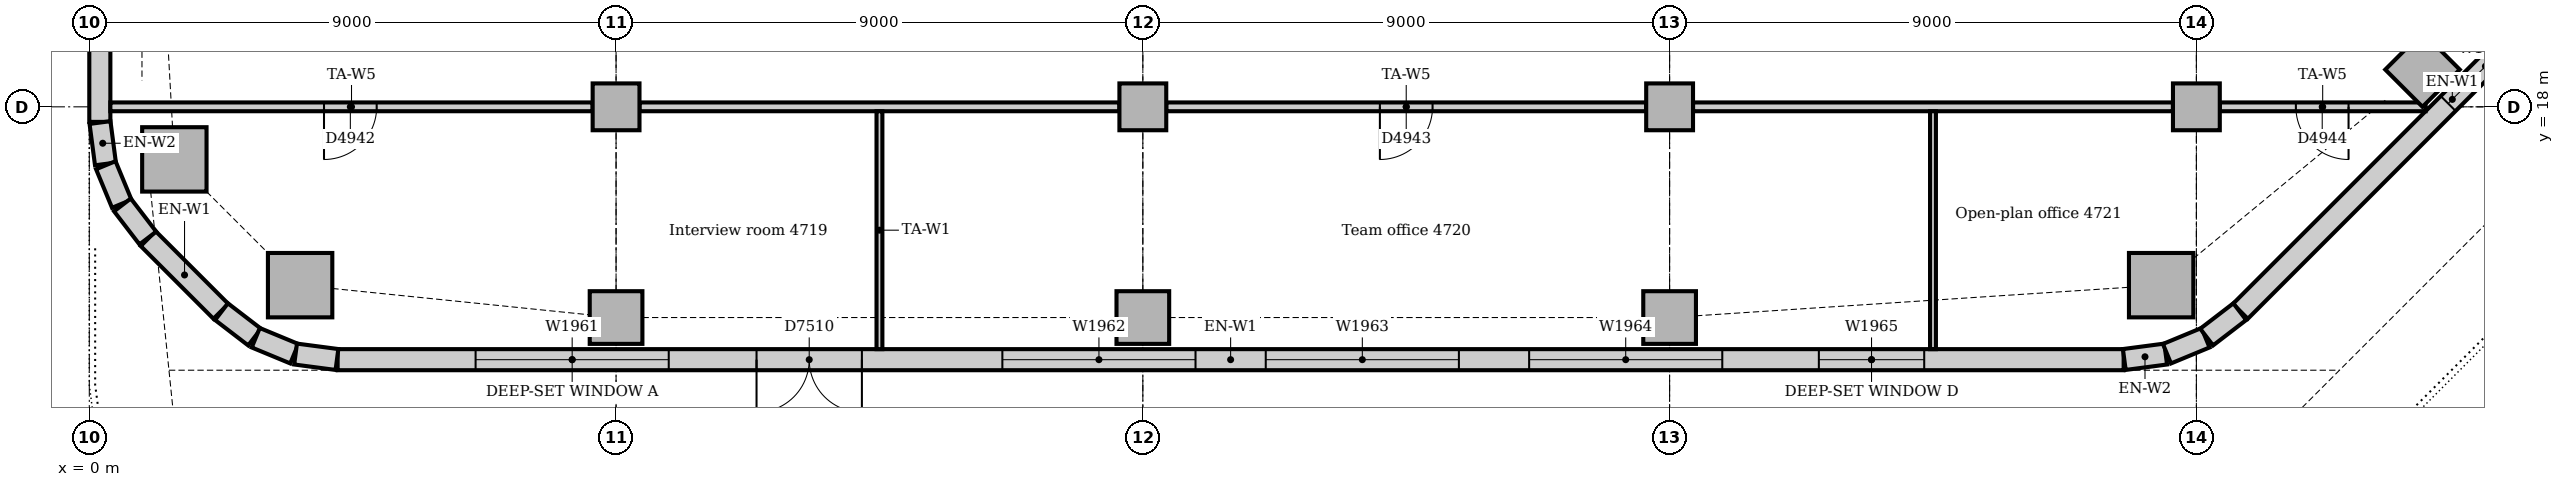
"""IFC4 building model, lengths in metres.
Left out: names, types, materials, properties, quantities, classifications, styles, units other than length and angle.
Written with IfcOpenShell. Run it as: python <this file> out.ifc"""

import sys

from ifc_helpers import new_model, si_unit, direction, frame, frame_2d, origin, origin_2d, place, context, subcontext, project, spatial, rectangle, extrude, element, fill, save


model = new_model("IFC4")
c1 = context("Model", 3, precision=1e-05, world=origin(), true_north=direction((0.0, 1.0)))
c2 = subcontext(c1, "Body", "Model", "MODEL_VIEW")
j1 = project(units=[si_unit("LENGTHUNIT", "METRE"), si_unit("PLANEANGLEUNIT", "RADIAN")], contexts=[c1])
p1 = place(None, origin())
s1 = spatial("IfcSite", under=j1, at=p1, CompositionType="ELEMENT")
p2 = place(p1, origin())
s2 = spatial("IfcBuilding", under=s1, at=p2, CompositionType="ELEMENT")
p3 = place(p2, frame((0.0, 0.0, 198.0)))
s3 = spatial("IfcBuildingStorey", under=s2, at=p3, CompositionType="ELEMENT", Elevation=198.0)
for number, where, z_axis, x_axis in (
    (1, (3.602, 14.953, -0.15), (0.0, 0.0, 1.0), (1.0, 0.0, 0.0)),
    (2, (35.398, 14.953, -0.15), (0.0, 0.0, 1.0), (1.0, 0.0, 0.0)),
    (3, (1.453, 17.102, -0.15), (0.0, 0.0, 1.0), (1.0, 0.0, 0.0)),
):
    element("IfcColumn", number, at=place(p3, frame(where, z_axis=z_axis, x_axis=x_axis)), inside=s3, PredefinedType="COLUMN", context=c2, shape_type="SweptSolid", body=[
        extrude(rectangle(XDim=1.1, YDim=1.1, at=origin_2d()), origin(), (0.0, 0.0, 1.0), 4.0),
    ])
for number, where, z_axis, x_axis in (
    (4, (9.0, 14.4, -0.15), (0.0, 0.0, 1.0), (1.0, 0.0, 0.0)),
    (5, (18.0, 14.4, -0.15), (0.0, 0.0, 1.0), (1.0, 0.0, 0.0)),
    (6, (27.0, 14.4, -0.15), (0.0, 0.0, 1.0), (1.0, 0.0, 0.0)),
    (7, (39.864, 18.636, -0.15), (0.0, 0.0, 1.0), (0.707, 0.707, 0.0)),
):
    element("IfcColumn", number, at=place(p3, frame(where, z_axis=z_axis, x_axis=x_axis)), inside=s3, PredefinedType="COLUMN", context=c2, shape_type="SweptSolid", body=[
        extrude(rectangle(XDim=0.9, YDim=0.9, at=origin_2d()), origin(), (0.0, 0.0, 1.0), 4.0),
    ])
for number, where, z_axis, x_axis in (
    (8, (9.0, 18.0, 0.0), (0.0, 0.0, 1.0), (1.0, 0.0, 0.0)),
    (9, (18.0, 18.0, 0.0), (0.0, 0.0, 1.0), (1.0, 0.0, 0.0)),
    (10, (27.0, 18.0, 0.0), (0.0, 0.0, 1.0), (1.0, 0.0, 0.0)),
    (11, (36.0, 18.0, 0.0), (0.0, 0.0, 1.0), (1.0, 0.0, 0.0)),
):
    element("IfcColumn", number, at=place(p3, frame(where, z_axis=z_axis, x_axis=x_axis)), inside=s3, PredefinedType="COLUMN", context=c2, shape_type="SweptSolid", body=[
        extrude(rectangle(XDim=0.8, YDim=0.8, at=origin_2d()), origin(), (0.0, 0.0, 1.0), 3.85),
    ])
p4 = place(p3, frame((4.243, 13.68, 0.0), z_axis=(0.0, 0.0, 1.0), x_axis=(1.0, 0.0, 0.0)))
e12 = element("IfcWall", 12, at=p4, inside=s3, PredefinedType="STANDARD", context=c2, shape_type="SweptSolid", body=[
    extrude(rectangle(XDim=30.515, YDim=0.36, at=frame_2d((15.257, 0.0))), origin(), (0.0, 0.0, 1.0), 3.85),
])
p5 = place(p4, frame((2.357, 0.0, 0.9)))
e13 = element("IfcOpeningElement", 13, at=p5, cuts=e12, PredefinedType="OPENING", context=c2, shape_type="SweptSolid", body=[
    extrude(rectangle(XDim=3.3, YDim=1.6, at=frame_2d((1.65, 0.8))), frame((0.0, 0.19, 0.0), z_axis=(0.0, -1.0, 0.0), x_axis=(1.0, 0.0, 0.0)), (0.0, 0.0, 1.0), 0.38),
])
p6 = place(p4, frame((7.157, 0.0, 0.0)))
e14 = element("IfcOpeningElement", 14, at=p6, cuts=e12, PredefinedType="OPENING", context=c2, shape_type="SweptSolid", body=[
    extrude(rectangle(XDim=1.8, YDim=2.4, at=frame_2d((0.9, 1.2))), frame((0.0, 0.19, 0.0), z_axis=(0.0, -1.0, 0.0), x_axis=(1.0, 0.0, 0.0)), (0.0, 0.0, 1.0), 0.38),
])
p7 = place(p4, frame((11.357, 0.0, 0.9)))
e15 = element("IfcOpeningElement", 15, at=p7, cuts=e12, PredefinedType="OPENING", context=c2, shape_type="SweptSolid", body=[
    extrude(rectangle(XDim=3.3, YDim=1.6, at=frame_2d((1.65, 0.8))), frame((0.0, 0.19, 0.0), z_axis=(0.0, -1.0, 0.0), x_axis=(1.0, 0.0, 0.0)), (0.0, 0.0, 1.0), 0.38),
])
p8 = place(p4, frame((15.857, 0.0, 0.9)))
e16 = element("IfcOpeningElement", 16, at=p8, cuts=e12, PredefinedType="OPENING", context=c2, shape_type="SweptSolid", body=[
    extrude(rectangle(XDim=3.3, YDim=1.6, at=frame_2d((1.65, 0.8))), frame((0.0, 0.19, 0.0), z_axis=(0.0, -1.0, 0.0), x_axis=(1.0, 0.0, 0.0)), (0.0, 0.0, 1.0), 0.38),
])
p9 = place(p4, frame((20.357, 0.0, 0.9)))
e17 = element("IfcOpeningElement", 17, at=p9, cuts=e12, PredefinedType="OPENING", context=c2, shape_type="SweptSolid", body=[
    extrude(rectangle(XDim=3.3, YDim=1.6, at=frame_2d((1.65, 0.8))), frame((0.0, 0.19, 0.0), z_axis=(0.0, -1.0, 0.0), x_axis=(1.0, 0.0, 0.0)), (0.0, 0.0, 1.0), 0.38),
])
p10 = place(p4, frame((25.307, 0.0, 0.9)))
e18 = element("IfcOpeningElement", 18, at=p10, cuts=e12, PredefinedType="OPENING", context=c2, shape_type="SweptSolid", body=[
    extrude(rectangle(XDim=1.8, YDim=1.6, at=frame_2d((0.9, 0.8))), frame((0.0, 0.19, 0.0), z_axis=(0.0, -1.0, 0.0), x_axis=(1.0, 0.0, 0.0)), (0.0, 0.0, 1.0), 0.38),
])
p11 = place(p3, frame((36.751, 14.506, 0.0), z_axis=(0.0, 0.0, 1.0), x_axis=(0.707106781187, 0.707106781187, 0.0)))
e19 = element("IfcWall", 19, at=p11, inside=s3, PredefinedType="STANDARD", context=c2, shape_type="SweptSolid", body=[
    extrude(rectangle(XDim=10.243, YDim=0.36, at=frame_2d((5.121, 0.0))), origin(), (0.0, 0.0, 1.0), 3.85),
])
p12 = place(p11, frame((5.021, 0.0, 0.9)))
e20 = element("IfcOpeningElement", 20, at=p12, cuts=e19, PredefinedType="OPENING", context=c2, shape_type="SweptSolid", body=[
    extrude(rectangle(XDim=1.8, YDim=1.6, at=frame_2d((0.9, 0.8))), frame((0.0, 0.19, 0.0), z_axis=(0.0, -1.0, 0.0), x_axis=(1.0, 0.0, 0.0)), (0.0, 0.0, 1.0), 0.38),
])
p13 = place(p3, frame((0.18, 21.0, 0.0), z_axis=(0.0, 0.0, 1.0), x_axis=(0.0, -1.0, 0.0)))
e21 = element("IfcWall", 21, at=p13, inside=s3, PredefinedType="STANDARD", context=c2, shape_type="SweptSolid", body=[
    extrude(rectangle(XDim=3.257, YDim=0.36, at=frame_2d((1.629, 0.0))), origin(), (0.0, 0.0, 1.0), 3.85),
])
p14 = place(p3, frame((1.006, 15.749, 0.0), z_axis=(0.0, 0.0, 1.0), x_axis=(0.707106781187, -0.707106781187, 0.0)))
e22 = element("IfcWall", 22, at=p14, inside=s3, PredefinedType="STANDARD", context=c2, shape_type="SweptSolid", body=[
    extrude(rectangle(XDim=1.757, YDim=0.36, at=frame_2d((0.879, 0.0))), origin(), (0.0, 0.0, 1.0), 3.85),
])
for number, where, z_axis, x_axis in (
    (23, (34.769, 13.683, 0.0), (0.0, 0.0, 1.0), (0.991, 0.131, 0.0)),
    (24, (35.497, 13.782, 0.0), (0.0, 0.0, 1.0), (0.924, 0.383, 0.0)),
):
    element("IfcWall", number, at=place(p3, frame(where, z_axis=z_axis, x_axis=x_axis)), inside=s3, PredefinedType="STANDARD", context=c2, shape_type="SweptSolid", body=[
        extrude(rectangle(XDim=0.713, YDim=0.36, at=frame_2d((0.356, 0.0))), origin(), (0.0, 0.0, 1.0), 3.85),
    ])
p15 = place(p3, frame((36.175, 14.066, 0.0), z_axis=(0.0, 0.0, 1.0), x_axis=(0.793321924995, 0.608802368033, 0.0)))
e25 = element("IfcWall", 25, at=p15, inside=s3, PredefinedType="STANDARD", context=c2, shape_type="SweptSolid", body=[
    extrude(rectangle(XDim=0.713, YDim=0.36, at=frame_2d((0.357, 0.0))), origin(), (0.0, 0.0, 1.0), 3.85),
])
for number, where, z_axis, x_axis in (
    (26, (0.183, 17.731, 0.0), (0.0, 0.0, 1.0), (0.131, -0.991, 0.0)),
    (27, (0.282, 17.003, 0.0), (0.0, 0.0, 1.0), (0.383, -0.924, 0.0)),
):
    element("IfcWall", number, at=place(p3, frame(where, z_axis=z_axis, x_axis=x_axis)), inside=s3, PredefinedType="STANDARD", context=c2, shape_type="SweptSolid", body=[
        extrude(rectangle(XDim=0.713, YDim=0.36, at=frame_2d((0.356, 0.0))), origin(), (0.0, 0.0, 1.0), 3.85),
    ])
for number, where, z_axis, x_axis in (
    (28, (0.566, 16.325, 0.0), (0.0, 0.0, 1.0), (0.609, -0.793, 0.0)),
    (29, (2.259, 14.5, 0.0), (0.0, 0.0, 1.0), (0.793, -0.609, 0.0)),
):
    element("IfcWall", number, at=place(p3, frame(where, z_axis=z_axis, x_axis=x_axis)), inside=s3, PredefinedType="STANDARD", context=c2, shape_type="SweptSolid", body=[
        extrude(rectangle(XDim=0.713, YDim=0.36, at=frame_2d((0.357, 0.0))), origin(), (0.0, 0.0, 1.0), 3.85),
    ])
for number, where, z_axis, x_axis in (
    (30, (2.844, 14.055, 0.0), (0.0, 0.0, 1.0), (0.924, -0.383, 0.0)),
    (31, (3.524, 13.776, 0.0), (0.0, 0.0, 1.0), (0.991, -0.131, 0.0)),
):
    element("IfcWall", number, at=place(p3, frame(where, z_axis=z_axis, x_axis=x_axis)), inside=s3, PredefinedType="STANDARD", context=c2, shape_type="SweptSolid", body=[
        extrude(rectangle(XDim=0.713, YDim=0.36, at=frame_2d((0.356, 0.0))), origin(), (0.0, 0.0, 1.0), 3.85),
    ])
p16 = place(p3, frame((36.4, 18.0, 0.0), z_axis=(0.0, 0.0, 1.0), x_axis=(1.0, 0.0, 0.0)))
e32 = element("IfcWall", 32, at=p16, inside=s3, PredefinedType="PARTITIONING", context=c2, shape_type="SweptSolid", body=[
    extrude(rectangle(XDim=3.516, YDim=0.15, at=frame_2d((1.758, 0.0))), origin(), (0.0, 0.0, 1.0), 3.602),
])
p17 = place(p16, frame((1.3, 0.0, 0.0)))
e33 = element("IfcOpeningElement", 33, at=p17, cuts=e32, PredefinedType="OPENING", context=c2, shape_type="SweptSolid", body=[
    extrude(rectangle(XDim=0.9, YDim=2.1, at=frame_2d((0.45, 1.05))), frame((0.0, 0.085, 0.0), z_axis=(0.0, -1.0, 0.0), x_axis=(1.0, 0.0, 0.0)), (0.0, 0.0, 1.0), 0.17),
])
p18 = place(p3, frame((27.4, 18.0, 0.0), z_axis=(0.0, 0.0, 1.0), x_axis=(1.0, 0.0, 0.0)))
e34 = element("IfcWall", 34, at=p18, inside=s3, PredefinedType="PARTITIONING", context=c2, shape_type="SweptSolid", body=[
    extrude(rectangle(XDim=8.2, YDim=0.15, at=frame_2d((4.1, 0.0))), origin(), (0.0, 0.0, 1.0), 3.254),
])
p19 = place(p3, frame((18.4, 18.0, 0.0), z_axis=(0.0, 0.0, 1.0), x_axis=(1.0, 0.0, 0.0)))
e35 = element("IfcWall", 35, at=p19, inside=s3, PredefinedType="PARTITIONING", context=c2, shape_type="SweptSolid", body=[
    extrude(rectangle(XDim=8.2, YDim=0.15, at=frame_2d((4.1, 0.0))), origin(), (0.0, 0.0, 1.0), 3.254),
])
p20 = place(p19, frame((3.65, 0.0, 0.0)))
e36 = element("IfcOpeningElement", 36, at=p20, cuts=e35, PredefinedType="OPENING", context=c2, shape_type="SweptSolid", body=[
    extrude(rectangle(XDim=0.9, YDim=2.1, at=frame_2d((0.45, 1.05))), frame((0.0, 0.085, 0.0), z_axis=(0.0, -1.0, 0.0), x_axis=(1.0, 0.0, 0.0)), (0.0, 0.0, 1.0), 0.17),
])
p21 = place(p3, frame((9.4, 18.0, 0.0), z_axis=(0.0, 0.0, 1.0), x_axis=(1.0, 0.0, 0.0)))
e37 = element("IfcWall", 37, at=p21, inside=s3, PredefinedType="PARTITIONING", context=c2, shape_type="SweptSolid", body=[
    extrude(rectangle(XDim=8.2, YDim=0.15, at=frame_2d((4.1, 0.0))), origin(), (0.0, 0.0, 1.0), 3.254),
])
p22 = place(p3, frame((0.36, 18.0, 0.0), z_axis=(0.0, 0.0, 1.0), x_axis=(1.0, 0.0, 0.0)))
e38 = element("IfcWall", 38, at=p22, inside=s3, PredefinedType="PARTITIONING", context=c2, shape_type="SweptSolid", body=[
    extrude(rectangle(XDim=8.24, YDim=0.15, at=frame_2d((4.12, 0.0))), origin(), (0.0, 0.0, 1.0), 3.254),
])
p23 = place(p22, frame((3.65, 0.0, 0.0)))
e39 = element("IfcOpeningElement", 39, at=p23, cuts=e38, PredefinedType="OPENING", context=c2, shape_type="SweptSolid", body=[
    extrude(rectangle(XDim=0.9, YDim=2.1, at=frame_2d((0.45, 1.05))), frame((0.0, 0.085, 0.0), z_axis=(0.0, -1.0, 0.0), x_axis=(1.0, 0.0, 0.0)), (0.0, 0.0, 1.0), 0.17),
])
for number, where, z_axis, x_axis in (
    (40, (13.5, 13.86, 0.0), (0.0, 0.0, 1.0), (0.0, 1.0, 0.0)),
    (41, (31.5, 13.86, 0.0), (0.0, 0.0, 1.0), (0.0, 1.0, 0.0)),
):
    element("IfcWall", number, at=place(p3, frame(where, z_axis=z_axis, x_axis=x_axis)), inside=s3, PredefinedType="PARTITIONING", context=c2, shape_type="SweptSolid", body=[
        extrude(rectangle(XDim=4.065, YDim=0.1, at=frame_2d((2.033, 0.0))), origin(), (0.0, 0.0, 1.0), 3.85),
    ])
p24 = place(p5, origin())
e42 = element("IfcWindow", 42, at=p24, inside=s3, PartitioningType="SINGLE_PANEL", PredefinedType="WINDOW", context=c2, shape_type="SweptSolid", body=[
    extrude(rectangle(XDim=3.3, YDim=1.6, at=frame_2d((1.65, 0.8))), frame((0.0, 0.13, 0.0), z_axis=(0.0, -1.0, 0.0), x_axis=(1.0, 0.0, 0.0)), (0.0, 0.0, 1.0), 0.06),
])
fill(e13, e42)
p25 = place(p6, frame((1.8, 0.0, 0.0), z_axis=(0.0, 0.0, 1.0), x_axis=(-1.0, 0.0, 0.0)))
e43 = element("IfcDoor", 43, at=p25, inside=s3, OperationType="DOUBLE_DOOR_SINGLE_SWING", PredefinedType="DOOR", context=c2, shape_type="SweptSolid", body=[
    extrude(rectangle(XDim=1.8, YDim=2.4, at=frame_2d((0.9, 1.2))), frame((0.0, -0.07, 0.0), z_axis=(0.0, -1.0, 0.0), x_axis=(1.0, 0.0, 0.0)), (0.0, 0.0, 1.0), 0.05),
])
fill(e14, e43)
p26 = place(p7, origin())
e44 = element("IfcWindow", 44, at=p26, inside=s3, PartitioningType="SINGLE_PANEL", PredefinedType="WINDOW", context=c2, shape_type="SweptSolid", body=[
    extrude(rectangle(XDim=3.3, YDim=1.6, at=frame_2d((1.65, 0.8))), frame((0.0, 0.13, 0.0), z_axis=(0.0, -1.0, 0.0), x_axis=(1.0, 0.0, 0.0)), (0.0, 0.0, 1.0), 0.06),
])
fill(e15, e44)
p27 = place(p8, origin())
e45 = element("IfcWindow", 45, at=p27, inside=s3, PartitioningType="SINGLE_PANEL", PredefinedType="WINDOW", context=c2, shape_type="SweptSolid", body=[
    extrude(rectangle(XDim=3.3, YDim=1.6, at=frame_2d((1.65, 0.8))), frame((0.0, 0.13, 0.0), z_axis=(0.0, -1.0, 0.0), x_axis=(1.0, 0.0, 0.0)), (0.0, 0.0, 1.0), 0.06),
])
fill(e16, e45)
p28 = place(p9, origin())
e46 = element("IfcWindow", 46, at=p28, inside=s3, PartitioningType="SINGLE_PANEL", PredefinedType="WINDOW", context=c2, shape_type="SweptSolid", body=[
    extrude(rectangle(XDim=3.3, YDim=1.6, at=frame_2d((1.65, 0.8))), frame((0.0, 0.13, 0.0), z_axis=(0.0, -1.0, 0.0), x_axis=(1.0, 0.0, 0.0)), (0.0, 0.0, 1.0), 0.06),
])
fill(e17, e46)
p29 = place(p10, origin())
e47 = element("IfcWindow", 47, at=p29, inside=s3, PartitioningType="SINGLE_PANEL", PredefinedType="WINDOW", context=c2, shape_type="SweptSolid", body=[
    extrude(rectangle(XDim=1.8, YDim=1.6, at=frame_2d((0.9, 0.8))), frame((0.0, 0.13, 0.0), z_axis=(0.0, -1.0, 0.0), x_axis=(1.0, 0.0, 0.0)), (0.0, 0.0, 1.0), 0.06),
])
fill(e18, e47)
p30 = place(p12, origin())
e48 = element("IfcWindow", 48, at=p30, inside=s3, PartitioningType="SINGLE_PANEL", PredefinedType="WINDOW", context=c2, shape_type="SweptSolid", body=[
    extrude(rectangle(XDim=1.8, YDim=1.6, at=frame_2d((0.9, 0.8))), frame((0.0, 0.13, 0.0), z_axis=(0.0, -1.0, 0.0), x_axis=(1.0, 0.0, 0.0)), (0.0, 0.0, 1.0), 0.06),
])
fill(e20, e48)
p31 = place(p23, frame((0.9, 0.0, 0.0), z_axis=(0.0, 0.0, 1.0), x_axis=(-1.0, 0.0, 0.0)))
e49 = element("IfcDoor", 49, at=p31, inside=s3, OperationType="SINGLE_SWING_RIGHT", PredefinedType="DOOR", context=c2, shape_type="SweptSolid", body=[
    extrude(rectangle(XDim=0.9, YDim=2.1, at=frame_2d((0.45, 1.05))), frame((0.0, 0.025, 0.0), z_axis=(0.0, -1.0, 0.0), x_axis=(1.0, 0.0, 0.0)), (0.0, 0.0, 1.0), 0.05),
])
fill(e39, e49)
p32 = place(p20, frame((0.9, 0.0, 0.0), z_axis=(0.0, 0.0, 1.0), x_axis=(-1.0, 0.0, 0.0)))
e50 = element("IfcDoor", 50, at=p32, inside=s3, OperationType="SINGLE_SWING_RIGHT", PredefinedType="DOOR", context=c2, shape_type="SweptSolid", body=[
    extrude(rectangle(XDim=0.9, YDim=2.1, at=frame_2d((0.45, 1.05))), frame((0.0, 0.025, 0.0), z_axis=(0.0, -1.0, 0.0), x_axis=(1.0, 0.0, 0.0)), (0.0, 0.0, 1.0), 0.05),
])
fill(e36, e50)
p33 = place(p17, frame((0.9, 0.0, 0.0), z_axis=(0.0, 0.0, 1.0), x_axis=(-1.0, 0.0, 0.0)))
e51 = element("IfcDoor", 51, at=p33, inside=s3, OperationType="SINGLE_SWING_LEFT", PredefinedType="DOOR", context=c2, shape_type="SweptSolid", body=[
    extrude(rectangle(XDim=0.9, YDim=2.1, at=frame_2d((0.45, 1.05))), frame((0.0, 0.025, 0.0), z_axis=(0.0, -1.0, 0.0), x_axis=(1.0, 0.0, 0.0)), (0.0, 0.0, 1.0), 0.05),
])
fill(e33, e51)
save(model, sys.argv[1])
